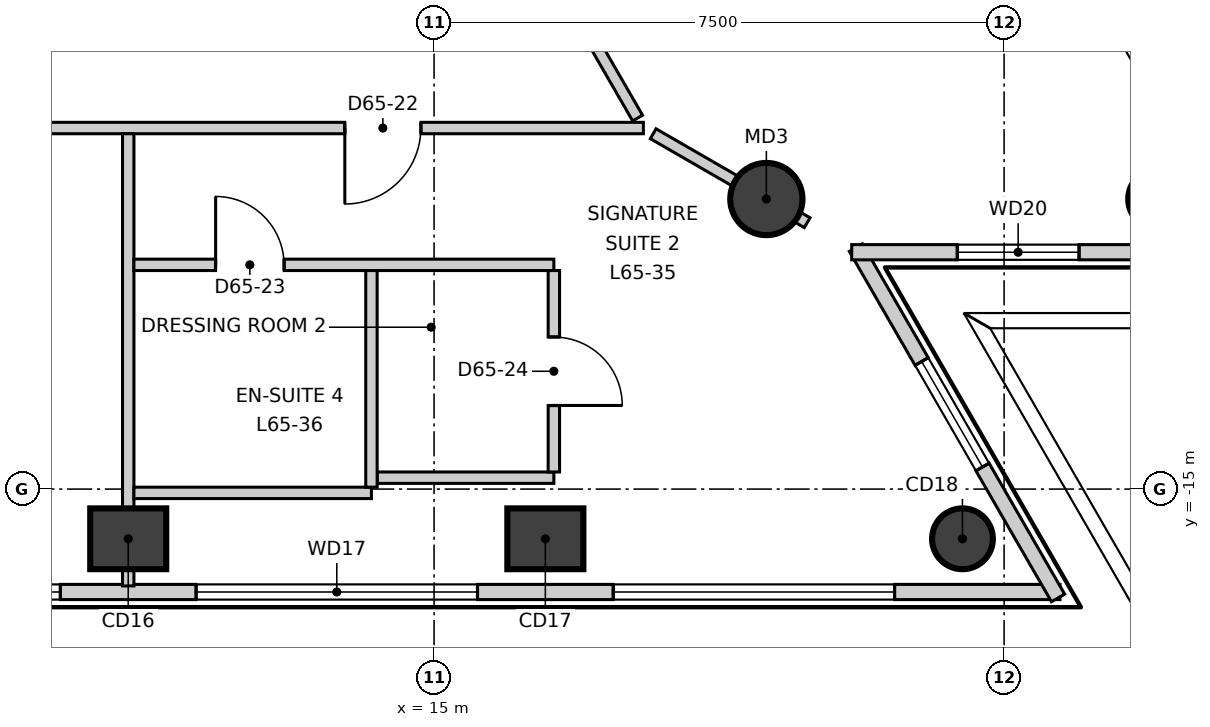
"""IFC4 building model, lengths in metres.
Left out: names, types, materials, properties, quantities, classifications, styles, units other than length and angle.
Written with IfcOpenShell. Run it as: python <this file> out.ifc"""

import sys

from ifc_helpers import new_model, si_unit, direction, frame, frame_2d, origin, origin_2d, place, context, subcontext, project, spatial, rectangle, circle, extrude, element, fill, save


model = new_model("IFC4")
c1 = context("Model", 3, precision=1e-05, world=origin(), true_north=direction((0.0, 1.0)))
c2 = subcontext(c1, "Body", "Model", "MODEL_VIEW")
j1 = project(units=[si_unit("LENGTHUNIT", "METRE"), si_unit("PLANEANGLEUNIT", "RADIAN")], contexts=[c1])
p1 = place(None, origin())
s1 = spatial("IfcSite", under=j1, at=p1, CompositionType="ELEMENT")
p2 = place(p1, origin())
s2 = spatial("IfcBuilding", under=s1, at=p2, CompositionType="ELEMENT")
p3 = place(p2, frame((0.0, 0.0, 279.1)))
s3 = spatial("IfcBuildingStorey", under=s2, at=p3, CompositionType="ELEMENT", Elevation=279.1)
for number, where, z_axis, x_axis in (
    (1, (10.976, -15.654, -0.3), (0.0, 0.0, 1.0), (1.0, 0.0, 0.0)),
    (2, (16.464, -15.654, -0.3), (0.0, 0.0, 1.0), (1.0, 0.0, 0.0)),
):
    element("IfcColumn", number, at=place(p3, frame(where, z_axis=z_axis, x_axis=x_axis)), inside=s3, PredefinedType="COLUMN", context=c2, shape_type="SweptSolid", body=[
        extrude(rectangle(XDim=1.0, YDim=0.8, at=origin_2d()), origin(), (0.0, 0.0, 1.0), 3.6),
    ])
for number, where, z_axis, x_axis in (
    (3, (21.952, -15.654, -0.3), (0.0, 0.0, 1.0), (1.0, 0.0, 0.0)),
    (4, (24.533, -11.184, -0.3), (0.0, 0.0, 1.0), (-0.5, 0.866, 0.0)),
):
    element("IfcColumn", number, at=place(p3, frame(where, z_axis=z_axis, x_axis=x_axis)), inside=s3, PredefinedType="COLUMN", context=c2, shape_type="SweptSolid", body=[
        extrude(circle(Radius=0.4, at=origin_2d()), origin(), (0.0, 0.0, 1.0), 3.6),
    ])
p4 = place(p3, frame((19.372, -11.184, -0.3), z_axis=(0.0, 0.0, 1.0), x_axis=(1.0, 0.0, 0.0)))
e5 = element("IfcColumn", 5, at=p4, inside=s3, PredefinedType="COLUMN", context=c2, shape_type="SweptSolid", body=[
    extrude(circle(Radius=0.475, at=origin_2d()), origin(), (0.0, 0.0, 1.0), 3.6),
])
p5 = place(p3, frame((-23.255, -16.354, 0.0), z_axis=(0.0, 0.0, 1.0), x_axis=(1.0, 0.0, 0.0)))
e6 = element("IfcWall", 6, at=p5, inside=s3, PredefinedType="ELEMENTEDWALL", context=c2, shape_type="SweptSolid", body=[
    extrude(rectangle(XDim=46.49, YDim=0.2, at=frame_2d((23.245, 0.0))), origin(), (0.0, 0.0, 1.0), 3.3),
])
p6 = place(p5, frame((2.197, 0.0, 0.9)))
e7 = element("IfcOpeningElement", 7, at=p6, cuts=e6, PredefinedType="OPENING", context=c2, shape_type="SweptSolid", body=[
    extrude(rectangle(XDim=3.7, YDim=2.2, at=frame_2d((1.85, 1.1))), frame((0.0, 0.11, 0.0), z_axis=(0.0, -1.0, 0.0), x_axis=(1.0, 0.0, 0.0)), (0.0, 0.0, 1.0), 0.22),
])
p7 = place(p5, frame((7.685, 0.0, 0.9)))
e8 = element("IfcOpeningElement", 8, at=p7, cuts=e6, PredefinedType="OPENING", context=c2, shape_type="SweptSolid", body=[
    extrude(rectangle(XDim=3.7, YDim=2.2, at=frame_2d((1.85, 1.1))), frame((0.0, 0.11, 0.0), z_axis=(0.0, -1.0, 0.0), x_axis=(1.0, 0.0, 0.0)), (0.0, 0.0, 1.0), 0.22),
])
p8 = place(p5, frame((13.173, 0.0, 0.9)))
e9 = element("IfcOpeningElement", 9, at=p8, cuts=e6, PredefinedType="OPENING", context=c2, shape_type="SweptSolid", body=[
    extrude(rectangle(XDim=3.7, YDim=2.2, at=frame_2d((1.85, 1.1))), frame((0.0, 0.11, 0.0), z_axis=(0.0, -1.0, 0.0), x_axis=(1.0, 0.0, 0.0)), (0.0, 0.0, 1.0), 0.22),
])
p9 = place(p5, frame((18.661, 0.0, 0.9)))
e10 = element("IfcOpeningElement", 10, at=p9, cuts=e6, PredefinedType="OPENING", context=c2, shape_type="SweptSolid", body=[
    extrude(rectangle(XDim=3.7, YDim=2.2, at=frame_2d((1.85, 1.1))), frame((0.0, 0.11, 0.0), z_axis=(0.0, -1.0, 0.0), x_axis=(1.0, 0.0, 0.0)), (0.0, 0.0, 1.0), 0.22),
])
p10 = place(p5, frame((24.149, 0.0, 0.9)))
e11 = element("IfcOpeningElement", 11, at=p10, cuts=e6, PredefinedType="OPENING", context=c2, shape_type="SweptSolid", body=[
    extrude(rectangle(XDim=3.7, YDim=2.2, at=frame_2d((1.85, 1.1))), frame((0.0, 0.11, 0.0), z_axis=(0.0, -1.0, 0.0), x_axis=(1.0, 0.0, 0.0)), (0.0, 0.0, 1.0), 0.22),
])
p11 = place(p5, frame((29.637, 0.0, 0.9)))
e12 = element("IfcOpeningElement", 12, at=p11, cuts=e6, PredefinedType="OPENING", context=c2, shape_type="SweptSolid", body=[
    extrude(rectangle(XDim=3.7, YDim=2.2, at=frame_2d((1.85, 1.1))), frame((0.0, 0.11, 0.0), z_axis=(0.0, -1.0, 0.0), x_axis=(1.0, 0.0, 0.0)), (0.0, 0.0, 1.0), 0.22),
])
p12 = place(p5, frame((35.125, 0.0, 0.9)))
e13 = element("IfcOpeningElement", 13, at=p12, cuts=e6, PredefinedType="OPENING", context=c2, shape_type="SweptSolid", body=[
    extrude(rectangle(XDim=3.7, YDim=2.2, at=frame_2d((1.85, 1.1))), frame((0.0, 0.11, 0.0), z_axis=(0.0, -1.0, 0.0), x_axis=(1.0, 0.0, 0.0)), (0.0, 0.0, 1.0), 0.22),
])
p13 = place(p5, frame((40.613, 0.0, 0.9)))
e14 = element("IfcOpeningElement", 14, at=p13, cuts=e6, PredefinedType="OPENING", context=c2, shape_type="SweptSolid", body=[
    extrude(rectangle(XDim=3.7, YDim=2.2, at=frame_2d((1.85, 1.1))), frame((0.0, 0.11, 0.0), z_axis=(0.0, -1.0, 0.0), x_axis=(1.0, 0.0, 0.0)), (0.0, 0.0, 1.0), 0.22),
])
p14 = place(p3, frame((23.21, -16.432, 0.0), z_axis=(0.0, 0.0, 1.0), x_axis=(-0.499854840714, 0.866109195318, 0.0)))
e15 = element("IfcWall", 15, at=p14, inside=s3, PredefinedType="ELEMENTEDWALL", context=c2, shape_type="SweptSolid", body=[
    extrude(rectangle(XDim=5.321, YDim=0.2, at=frame_2d((2.661, 0.0))), origin(), (0.0, 0.0, 1.0), 3.3),
])
p15 = place(p14, frame((1.99, 0.0, 0.9)))
e16 = element("IfcOpeningElement", 16, at=p15, cuts=e15, PredefinedType="OPENING", context=c2, shape_type="SweptSolid", body=[
    extrude(rectangle(XDim=1.6, YDim=2.2, at=frame_2d((0.8, 1.1))), frame((0.0, 0.11, 0.0), z_axis=(0.0, -1.0, 0.0), x_axis=(1.0, 0.0, 0.0)), (0.0, 0.0, 1.0), 0.22),
])
p16 = place(p3, frame((20.495, -11.884, 0.0), z_axis=(0.0, 0.0, 1.0), x_axis=(1.0, 0.0, 0.0)))
e17 = element("IfcWall", 17, at=p16, inside=s3, PredefinedType="ELEMENTEDWALL", context=c2, shape_type="SweptSolid", body=[
    extrude(rectangle(XDim=5.321, YDim=0.2, at=frame_2d((2.66, 0.0))), origin(), (0.0, 0.0, 1.0), 3.3),
])
p17 = place(p16, frame((1.39, 0.0, 0.9)))
e18 = element("IfcOpeningElement", 18, at=p17, cuts=e17, PredefinedType="OPENING", context=c2, shape_type="SweptSolid", body=[
    extrude(rectangle(XDim=1.6, YDim=2.2, at=frame_2d((0.8, 1.1))), frame((0.0, 0.11, 0.0), z_axis=(0.0, -1.0, 0.0), x_axis=(1.0, 0.0, 0.0)), (0.0, 0.0, 1.0), 0.22),
])
p18 = place(p3, frame((25.791, -11.962, 0.0), z_axis=(0.0, 0.0, 1.0), x_axis=(-0.500006870765, 0.86602143691, 0.0)))
e19 = element("IfcWall", 19, at=p18, inside=s3, PredefinedType="ELEMENTEDWALL", context=c2, shape_type="SweptSolid", body=[
    extrude(rectangle(XDim=46.49, YDim=0.2, at=frame_2d((23.245, 0.0))), origin(), (0.0, 0.0, 1.0), 3.3),
])
p19 = place(p18, frame((2.197, 0.0, 0.9)))
e20 = element("IfcOpeningElement", 20, at=p19, cuts=e19, PredefinedType="OPENING", context=c2, shape_type="SweptSolid", body=[
    extrude(rectangle(XDim=3.7, YDim=2.2, at=frame_2d((1.85, 1.1))), frame((0.0, 0.11, 0.0), z_axis=(0.0, -1.0, 0.0), x_axis=(1.0, 0.0, 0.0)), (0.0, 0.0, 1.0), 0.22),
])
p20 = place(p18, frame((7.685, 0.0, 0.9)))
e21 = element("IfcOpeningElement", 21, at=p20, cuts=e19, PredefinedType="OPENING", context=c2, shape_type="SweptSolid", body=[
    extrude(rectangle(XDim=3.7, YDim=2.2, at=frame_2d((1.85, 1.1))), frame((0.0, 0.11, 0.0), z_axis=(0.0, -1.0, 0.0), x_axis=(1.0, 0.0, 0.0)), (0.0, 0.0, 1.0), 0.22),
])
p21 = place(p18, frame((13.173, 0.0, 0.9)))
e22 = element("IfcOpeningElement", 22, at=p21, cuts=e19, PredefinedType="OPENING", context=c2, shape_type="SweptSolid", body=[
    extrude(rectangle(XDim=3.7, YDim=2.2, at=frame_2d((1.85, 1.1))), frame((0.0, 0.11, 0.0), z_axis=(0.0, -1.0, 0.0), x_axis=(1.0, 0.0, 0.0)), (0.0, 0.0, 1.0), 0.22),
])
p22 = place(p18, frame((18.661, 0.0, 0.9)))
e23 = element("IfcOpeningElement", 23, at=p22, cuts=e19, PredefinedType="OPENING", context=c2, shape_type="SweptSolid", body=[
    extrude(rectangle(XDim=3.7, YDim=2.2, at=frame_2d((1.85, 1.1))), frame((0.0, 0.11, 0.0), z_axis=(0.0, -1.0, 0.0), x_axis=(1.0, 0.0, 0.0)), (0.0, 0.0, 1.0), 0.22),
])
p23 = place(p18, frame((24.149, 0.0, 0.9)))
e24 = element("IfcOpeningElement", 24, at=p23, cuts=e19, PredefinedType="OPENING", context=c2, shape_type="SweptSolid", body=[
    extrude(rectangle(XDim=3.7, YDim=2.2, at=frame_2d((1.85, 1.1))), frame((0.0, 0.11, 0.0), z_axis=(0.0, -1.0, 0.0), x_axis=(1.0, 0.0, 0.0)), (0.0, 0.0, 1.0), 0.22),
])
p24 = place(p18, frame((29.637, 0.0, 0.9)))
e25 = element("IfcOpeningElement", 25, at=p24, cuts=e19, PredefinedType="OPENING", context=c2, shape_type="SweptSolid", body=[
    extrude(rectangle(XDim=3.7, YDim=2.2, at=frame_2d((1.85, 1.1))), frame((0.0, 0.11, 0.0), z_axis=(0.0, -1.0, 0.0), x_axis=(1.0, 0.0, 0.0)), (0.0, 0.0, 1.0), 0.22),
])
p25 = place(p18, frame((35.125, 0.0, 0.9)))
e26 = element("IfcOpeningElement", 26, at=p25, cuts=e19, PredefinedType="OPENING", context=c2, shape_type="SweptSolid", body=[
    extrude(rectangle(XDim=3.7, YDim=2.2, at=frame_2d((1.85, 1.1))), frame((0.0, 0.11, 0.0), z_axis=(0.0, -1.0, 0.0), x_axis=(1.0, 0.0, 0.0)), (0.0, 0.0, 1.0), 0.22),
])
p26 = place(p18, frame((40.613, 0.0, 0.9)))
e27 = element("IfcOpeningElement", 27, at=p26, cuts=e19, PredefinedType="OPENING", context=c2, shape_type="SweptSolid", body=[
    extrude(rectangle(XDim=3.7, YDim=2.2, at=frame_2d((1.85, 1.1))), frame((0.0, 0.11, 0.0), z_axis=(0.0, -1.0, 0.0), x_axis=(1.0, 0.0, 0.0)), (0.0, 0.0, 1.0), 0.22),
])
p27 = place(p3, frame((-17.604, -10.25, 0.0), z_axis=(0.0, 0.0, 1.0), x_axis=(1.0, 0.0, 0.0)))
e28 = element("IfcWall", 28, at=p27, inside=s3, PredefinedType="PARTITIONING", context=c2, shape_type="SweptSolid", body=[
    extrude(rectangle(XDim=35.358, YDim=0.15, at=frame_2d((17.679, 0.0))), origin(), (0.0, 0.0, 1.0), 3.3),
])
p28 = place(p27, frame((2.7, 0.0, 0.0)))
e29 = element("IfcOpeningElement", 29, at=p28, cuts=e28, PredefinedType="OPENING", context=c2, shape_type="SweptSolid", body=[
    extrude(rectangle(XDim=1.0, YDim=2.1, at=frame_2d((0.5, 1.05))), frame((0.0, 0.085, 0.0), z_axis=(0.0, -1.0, 0.0), x_axis=(1.0, 0.0, 0.0)), (0.0, 0.0, 1.0), 0.17),
])
p29 = place(p27, frame((14.878, 0.0, 0.0)))
e30 = element("IfcOpeningElement", 30, at=p29, cuts=e28, PredefinedType="OPENING", context=c2, shape_type="SweptSolid", body=[
    extrude(rectangle(XDim=1.0, YDim=2.1, at=frame_2d((0.5, 1.05))), frame((0.0, 0.085, 0.0), z_axis=(0.0, -1.0, 0.0), x_axis=(1.0, 0.0, 0.0)), (0.0, 0.0, 1.0), 0.17),
])
p30 = place(p27, frame((9.578, 0.0, 0.0)))
e31 = element("IfcOpeningElement", 31, at=p30, cuts=e28, PredefinedType="OPENING", context=c2, shape_type="SweptSolid", body=[
    extrude(rectangle(XDim=0.9, YDim=2.1, at=frame_2d((0.45, 1.05))), frame((0.0, 0.085, 0.0), z_axis=(0.0, -1.0, 0.0), x_axis=(1.0, 0.0, 0.0)), (0.0, 0.0, 1.0), 0.17),
])
p31 = place(p27, frame((11.678, 0.0, 0.0)))
e32 = element("IfcOpeningElement", 32, at=p31, cuts=e28, PredefinedType="OPENING", context=c2, shape_type="SweptSolid", body=[
    extrude(rectangle(XDim=0.9, YDim=2.1, at=frame_2d((0.45, 1.05))), frame((0.0, 0.085, 0.0), z_axis=(0.0, -1.0, 0.0), x_axis=(1.0, 0.0, 0.0)), (0.0, 0.0, 1.0), 0.17),
])
p32 = place(p27, frame((25.854, 0.0, 0.0)))
e33 = element("IfcOpeningElement", 33, at=p32, cuts=e28, PredefinedType="OPENING", context=c2, shape_type="SweptSolid", body=[
    extrude(rectangle(XDim=1.0, YDim=2.1, at=frame_2d((0.5, 1.05))), frame((0.0, 0.085, 0.0), z_axis=(0.0, -1.0, 0.0), x_axis=(1.0, 0.0, 0.0)), (0.0, 0.0, 1.0), 0.17),
])
p33 = place(p27, frame((20.554, 0.0, 0.0)))
e34 = element("IfcOpeningElement", 34, at=p33, cuts=e28, PredefinedType="OPENING", context=c2, shape_type="SweptSolid", body=[
    extrude(rectangle(XDim=0.9, YDim=2.1, at=frame_2d((0.45, 1.05))), frame((0.0, 0.085, 0.0), z_axis=(0.0, -1.0, 0.0), x_axis=(1.0, 0.0, 0.0)), (0.0, 0.0, 1.0), 0.17),
])
p34 = place(p27, frame((22.654, 0.0, 0.0)))
e35 = element("IfcOpeningElement", 35, at=p34, cuts=e28, PredefinedType="OPENING", context=c2, shape_type="SweptSolid", body=[
    extrude(rectangle(XDim=0.9, YDim=2.1, at=frame_2d((0.45, 1.05))), frame((0.0, 0.085, 0.0), z_axis=(0.0, -1.0, 0.0), x_axis=(1.0, 0.0, 0.0)), (0.0, 0.0, 1.0), 0.17),
])
p35 = place(p27, frame((31.43, 0.0, 0.0)))
e36 = element("IfcOpeningElement", 36, at=p35, cuts=e28, PredefinedType="OPENING", context=c2, shape_type="SweptSolid", body=[
    extrude(rectangle(XDim=1.0, YDim=2.1, at=frame_2d((0.5, 1.05))), frame((0.0, 0.085, 0.0), z_axis=(0.0, -1.0, 0.0), x_axis=(1.0, 0.0, 0.0)), (0.0, 0.0, 1.0), 0.17),
])
p36 = place(p3, frame((17.883, -10.325, 0.0), z_axis=(0.0, 0.0, 1.0), x_axis=(0.865928350888, -0.500168062883, 0.0)))
e37 = element("IfcWall", 37, at=p36, inside=s3, PredefinedType="PARTITIONING", context=c2, shape_type="SweptSolid", body=[
    extrude(rectangle(XDim=2.34, YDim=0.15, at=frame_2d((1.17, 0.0))), origin(), (0.0, 0.0, 1.0), 2.8),
])
p37 = place(p3, frame((0.075, 20.37, 0.0), z_axis=(0.0, 0.0, 1.0), x_axis=(0.500003985697, -0.866023102629, 0.0)))
e38 = element("IfcWall", 38, at=p37, inside=s3, PredefinedType="PARTITIONING", context=c2, shape_type="SweptSolid", body=[
    extrude(rectangle(XDim=35.206, YDim=0.15, at=frame_2d((17.603, 0.0))), origin(), (0.0, 0.0, 1.0), 3.3),
])
p38 = place(p37, frame((31.506, 0.0, 0.0)))
e39 = element("IfcOpeningElement", 39, at=p38, cuts=e38, PredefinedType="OPENING", context=c2, shape_type="SweptSolid", body=[
    extrude(rectangle(XDim=1.0, YDim=2.1, at=frame_2d((0.5, 1.05))), frame((0.0, 0.085, 0.0), z_axis=(0.0, -1.0, 0.0), x_axis=(1.0, 0.0, 0.0)), (0.0, 0.0, 1.0), 0.17),
])
p39 = place(p37, frame((26.529, 0.0, 0.0)))
e40 = element("IfcOpeningElement", 40, at=p39, cuts=e38, PredefinedType="OPENING", context=c2, shape_type="SweptSolid", body=[
    extrude(rectangle(XDim=1.0, YDim=2.1, at=frame_2d((0.5, 1.05))), frame((0.0, 0.085, 0.0), z_axis=(0.0, -1.0, 0.0), x_axis=(1.0, 0.0, 0.0)), (0.0, 0.0, 1.0), 0.17),
])
p40 = place(p37, frame((19.442, 0.0, 0.0)))
e41 = element("IfcOpeningElement", 41, at=p40, cuts=e38, PredefinedType="OPENING", context=c2, shape_type="SweptSolid", body=[
    extrude(rectangle(XDim=1.0, YDim=2.1, at=frame_2d((0.5, 1.05))), frame((0.0, 0.085, 0.0), z_axis=(0.0, -1.0, 0.0), x_axis=(1.0, 0.0, 0.0)), (0.0, 0.0, 1.0), 0.17),
])
p41 = place(p37, frame((8.254, 0.0, 0.0)))
e42 = element("IfcOpeningElement", 42, at=p41, cuts=e38, PredefinedType="OPENING", context=c2, shape_type="SweptSolid", body=[
    extrude(rectangle(XDim=1.0, YDim=2.1, at=frame_2d((0.5, 1.05))), frame((0.0, 0.085, 0.0), z_axis=(0.0, -1.0, 0.0), x_axis=(1.0, 0.0, 0.0)), (0.0, 0.0, 1.0), 0.17),
])
p42 = place(p37, frame((13.754, 0.0, 0.0)))
e43 = element("IfcOpeningElement", 43, at=p42, cuts=e38, PredefinedType="OPENING", context=c2, shape_type="SweptSolid", body=[
    extrude(rectangle(XDim=0.9, YDim=2.1, at=frame_2d((0.45, 1.05))), frame((0.0, 0.085, 0.0), z_axis=(0.0, -1.0, 0.0), x_axis=(1.0, 0.0, 0.0)), (0.0, 0.0, 1.0), 0.17),
])
p43 = place(p37, frame((11.554, 0.0, 0.0)))
e44 = element("IfcOpeningElement", 44, at=p43, cuts=e38, PredefinedType="OPENING", context=c2, shape_type="SweptSolid", body=[
    extrude(rectangle(XDim=0.9, YDim=2.1, at=frame_2d((0.45, 1.05))), frame((0.0, 0.085, 0.0), z_axis=(0.0, -1.0, 0.0), x_axis=(1.0, 0.0, 0.0)), (0.0, 0.0, 1.0), 0.17),
])
p44 = place(p37, frame((2.777, 0.0, 0.0)))
e45 = element("IfcOpeningElement", 45, at=p44, cuts=e38, PredefinedType="OPENING", context=c2, shape_type="SweptSolid", body=[
    extrude(rectangle(XDim=1.0, YDim=2.1, at=frame_2d((0.5, 1.05))), frame((0.0, 0.085, 0.0), z_axis=(0.0, -1.0, 0.0), x_axis=(1.0, 0.0, 0.0)), (0.0, 0.0, 1.0), 0.17),
])
p45 = place(p3, frame((10.976, -16.274, 0.0), z_axis=(0.0, 0.0, 1.0), x_axis=(0.0, 1.0, 0.0)))
e46 = element("IfcWall", 46, at=p45, inside=s3, PredefinedType="PARTITIONING", context=c2, shape_type="SweptSolid", body=[
    extrude(rectangle(XDim=5.949, YDim=0.15, at=frame_2d((2.975, 0.0))), origin(), (0.0, 0.0, 1.0), 3.3),
])
p46 = place(p3, frame((11.051, -12.05, 0.0), z_axis=(0.0, 0.0, 1.0), x_axis=(1.0, 0.0, 0.0)))
e47 = element("IfcWall", 47, at=p46, inside=s3, PredefinedType="PARTITIONING", context=c2, shape_type="SweptSolid", body=[
    extrude(rectangle(XDim=5.525, YDim=0.15, at=frame_2d((2.762, 0.0))), origin(), (0.0, 0.0, 1.0), 3.3),
])
p47 = place(p46, frame((1.075, 0.0, 0.0)))
e48 = element("IfcOpeningElement", 48, at=p47, cuts=e47, PredefinedType="OPENING", context=c2, shape_type="SweptSolid", body=[
    extrude(rectangle(XDim=0.9, YDim=2.1, at=frame_2d((0.45, 1.05))), frame((0.0, 0.085, 0.0), z_axis=(0.0, -1.0, 0.0), x_axis=(1.0, 0.0, 0.0)), (0.0, 0.0, 1.0), 0.17),
])
p48 = place(p3, frame((14.251, -14.85, 0.0), z_axis=(0.0, 0.0, 1.0), x_axis=(1.0, 0.0, 0.0)))
e49 = element("IfcWall", 49, at=p48, inside=s3, PredefinedType="PARTITIONING", context=c2, shape_type="SweptSolid", body=[
    extrude(rectangle(XDim=2.325, YDim=0.15, at=frame_2d((1.163, 0.0))), origin(), (0.0, 0.0, 1.0), 3.3),
])
p49 = place(p3, frame((11.051, -15.05, 0.0), z_axis=(0.0, 0.0, 1.0), x_axis=(1.0, 0.0, 0.0)))
e50 = element("IfcWall", 50, at=p49, inside=s3, PredefinedType="PARTITIONING", context=c2, shape_type="SweptSolid", body=[
    extrude(rectangle(XDim=3.125, YDim=0.15, at=frame_2d((1.562, 0.0))), origin(), (0.0, 0.0, 1.0), 3.3),
])
p50 = place(p3, frame((14.176, -14.975, 0.0), z_axis=(0.0, 0.0, 1.0), x_axis=(0.0, 1.0, 0.0)))
e51 = element("IfcWall", 51, at=p50, inside=s3, PredefinedType="PARTITIONING", context=c2, shape_type="SweptSolid", body=[
    extrude(rectangle(XDim=2.85, YDim=0.15, at=frame_2d((1.425, 0.0))), origin(), (0.0, 0.0, 1.0), 3.3),
])
p51 = place(p3, frame((16.576, -14.775, 0.0), z_axis=(0.0, 0.0, 1.0), x_axis=(0.0, 1.0, 0.0)))
e52 = element("IfcWall", 52, at=p51, inside=s3, PredefinedType="PARTITIONING", context=c2, shape_type="SweptSolid", body=[
    extrude(rectangle(XDim=2.65, YDim=0.15, at=frame_2d((1.325, 0.0))), origin(), (0.0, 0.0, 1.0), 3.3),
])
p52 = place(p51, frame((0.875, 0.0, 0.0)))
e53 = element("IfcOpeningElement", 53, at=p52, cuts=e52, PredefinedType="OPENING", context=c2, shape_type="SweptSolid", body=[
    extrude(rectangle(XDim=0.9, YDim=2.1, at=frame_2d((0.45, 1.05))), frame((0.0, 0.085, 0.0), z_axis=(0.0, -1.0, 0.0), x_axis=(1.0, 0.0, 0.0)), (0.0, 0.0, 1.0), 0.17),
])
p53 = place(p11, origin())
e54 = element("IfcWindow", 54, at=p53, inside=s3, PartitioningType="SINGLE_PANEL", PredefinedType="WINDOW", context=c2, shape_type="SweptSolid", body=[
    extrude(rectangle(XDim=3.7, YDim=2.2, at=frame_2d((1.85, 1.1))), frame((0.0, 0.03, 0.0), z_axis=(0.0, -1.0, 0.0), x_axis=(1.0, 0.0, 0.0)), (0.0, 0.0, 1.0), 0.06),
])
fill(e12, e54)
p54 = place(p12, origin())
e55 = element("IfcWindow", 55, at=p54, inside=s3, PartitioningType="SINGLE_PANEL", PredefinedType="WINDOW", context=c2, shape_type="SweptSolid", body=[
    extrude(rectangle(XDim=3.7, YDim=2.2, at=frame_2d((1.85, 1.1))), frame((0.0, 0.03, 0.0), z_axis=(0.0, -1.0, 0.0), x_axis=(1.0, 0.0, 0.0)), (0.0, 0.0, 1.0), 0.06),
])
fill(e13, e55)
p55 = place(p13, origin())
e56 = element("IfcWindow", 56, at=p55, inside=s3, PartitioningType="SINGLE_PANEL", PredefinedType="WINDOW", context=c2, shape_type="SweptSolid", body=[
    extrude(rectangle(XDim=3.7, YDim=2.2, at=frame_2d((1.85, 1.1))), frame((0.0, 0.03, 0.0), z_axis=(0.0, -1.0, 0.0), x_axis=(1.0, 0.0, 0.0)), (0.0, 0.0, 1.0), 0.06),
])
fill(e14, e56)
p56 = place(p15, origin())
e57 = element("IfcWindow", 57, at=p56, inside=s3, PartitioningType="SINGLE_PANEL", PredefinedType="WINDOW", context=c2, shape_type="SweptSolid", body=[
    extrude(rectangle(XDim=1.6, YDim=2.2, at=frame_2d((0.8, 1.1))), frame((0.0, 0.03, 0.0), z_axis=(0.0, -1.0, 0.0), x_axis=(1.0, 0.0, 0.0)), (0.0, 0.0, 1.0), 0.06),
])
fill(e16, e57)
p57 = place(p17, origin())
e58 = element("IfcWindow", 58, at=p57, inside=s3, PartitioningType="SINGLE_PANEL", PredefinedType="WINDOW", context=c2, shape_type="SweptSolid", body=[
    extrude(rectangle(XDim=1.6, YDim=2.2, at=frame_2d((0.8, 1.1))), frame((0.0, 0.03, 0.0), z_axis=(0.0, -1.0, 0.0), x_axis=(1.0, 0.0, 0.0)), (0.0, 0.0, 1.0), 0.06),
])
fill(e18, e58)
p58 = place(p19, origin())
e59 = element("IfcWindow", 59, at=p58, inside=s3, PartitioningType="SINGLE_PANEL", PredefinedType="WINDOW", context=c2, shape_type="SweptSolid", body=[
    extrude(rectangle(XDim=3.7, YDim=2.2, at=frame_2d((1.85, 1.1))), frame((0.0, 0.03, 0.0), z_axis=(0.0, -1.0, 0.0), x_axis=(1.0, 0.0, 0.0)), (0.0, 0.0, 1.0), 0.06),
])
fill(e20, e59)
p59 = place(p35, origin())
e60 = element("IfcDoor", 60, at=p59, inside=s3, OperationType="SINGLE_SWING_LEFT", PredefinedType="DOOR", context=c2, shape_type="SweptSolid", body=[
    extrude(rectangle(XDim=1.0, YDim=2.1, at=frame_2d((0.5, 1.05))), frame((0.0, 0.025, 0.0), z_axis=(0.0, -1.0, 0.0), x_axis=(1.0, 0.0, 0.0)), (0.0, 0.0, 1.0), 0.05),
])
fill(e36, e60)
p60 = place(p47, origin())
e61 = element("IfcDoor", 61, at=p60, inside=s3, OperationType="SINGLE_SWING_RIGHT", PredefinedType="DOOR", context=c2, shape_type="SweptSolid", body=[
    extrude(rectangle(XDim=0.9, YDim=2.1, at=frame_2d((0.45, 1.05))), frame((0.0, 0.025, 0.0), z_axis=(0.0, -1.0, 0.0), x_axis=(1.0, 0.0, 0.0)), (0.0, 0.0, 1.0), 0.05),
])
fill(e48, e61)
p61 = place(p52, origin())
e62 = element("IfcDoor", 62, at=p61, inside=s3, OperationType="SINGLE_SWING_LEFT", PredefinedType="DOOR", context=c2, shape_type="SweptSolid", body=[
    extrude(rectangle(XDim=0.9, YDim=2.1, at=frame_2d((0.45, 1.05))), frame((0.0, 0.025, 0.0), z_axis=(0.0, -1.0, 0.0), x_axis=(1.0, 0.0, 0.0)), (0.0, 0.0, 1.0), 0.05),
])
fill(e53, e62)
save(model, sys.argv[1])
